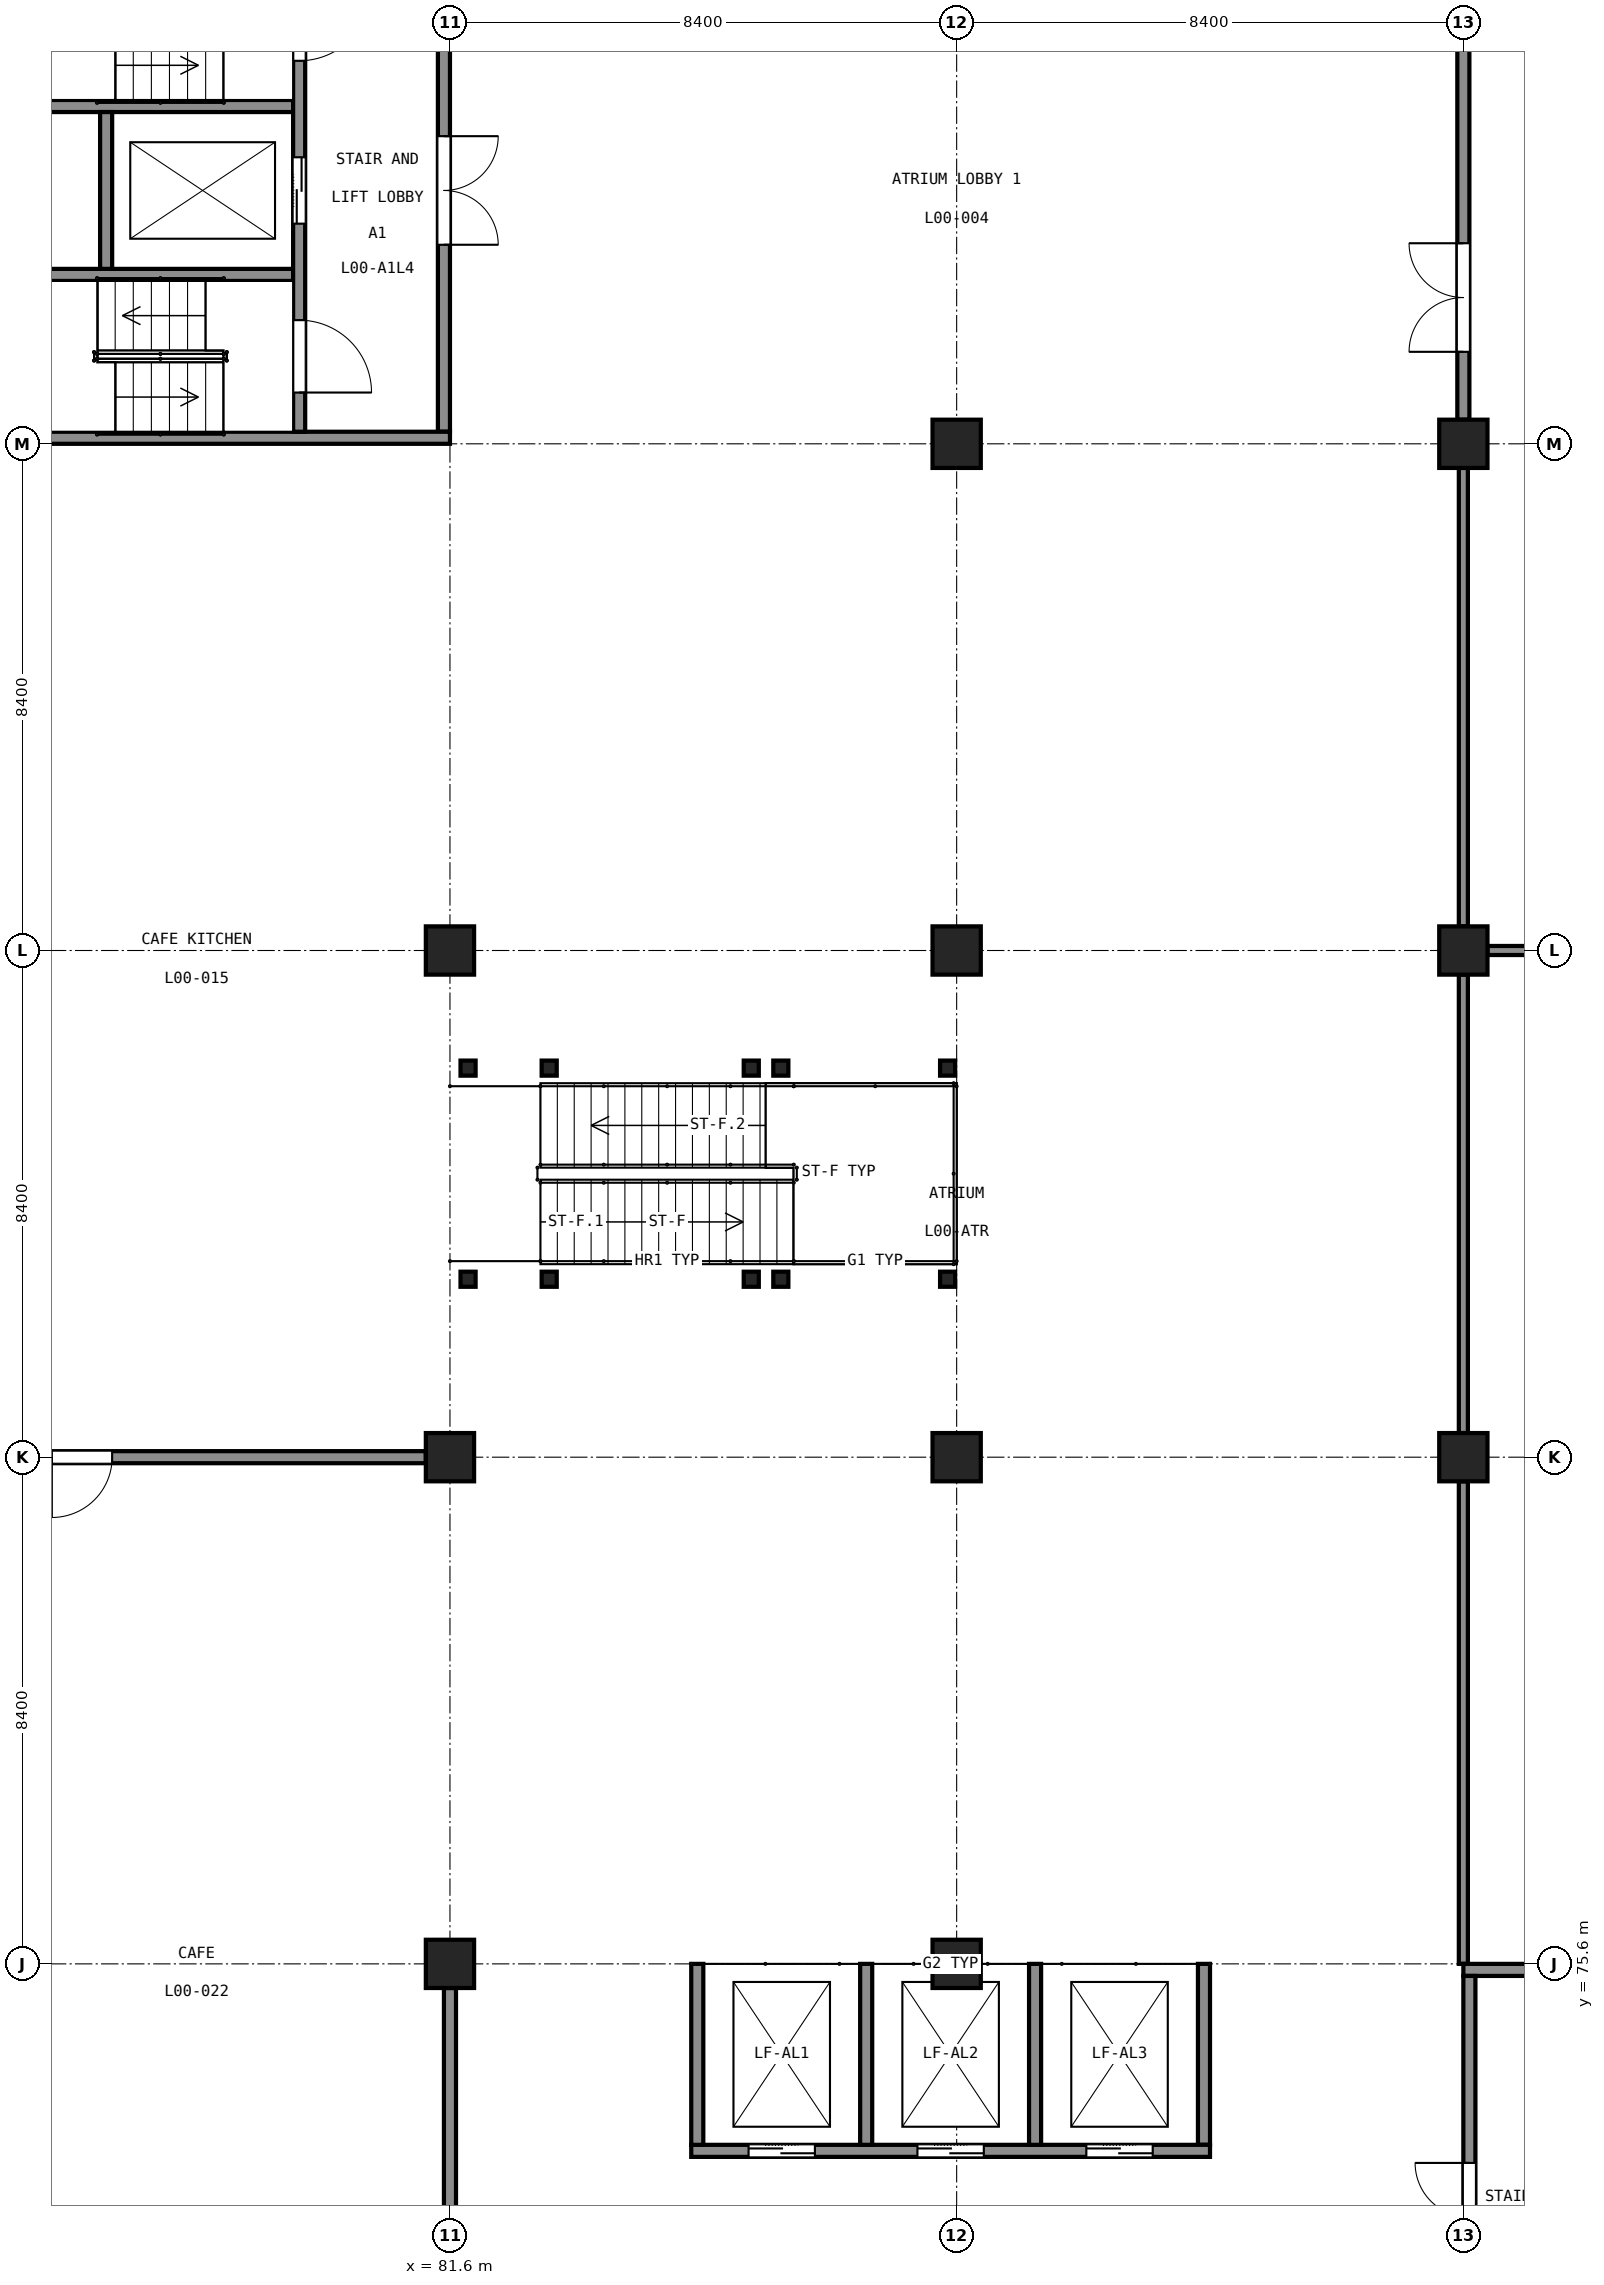
"""IFC4 building model, lengths in metres.
Left out: names, types, materials, properties, quantities, classifications, styles, units other than length and angle.
Written with IfcOpenShell. Run it as: python <this file> out.ifc"""

import sys

from ifc_helpers import new_model, si_unit, direction, frame, frame_2d, origin, origin_2d, place, context, subcontext, project, spatial, rectangle, hollow_rectangle, extrude, element, fill, save


model = new_model("IFC4")
c1 = context("Model", 3, precision=1e-05, world=origin(), true_north=direction((0.0, 1.0)))
c2 = subcontext(c1, "Body", "Model", "MODEL_VIEW")
j1 = project(units=[si_unit("LENGTHUNIT", "METRE"), si_unit("PLANEANGLEUNIT", "RADIAN")], contexts=[c1])
p1 = place(None, origin())
s1 = spatial("IfcSite", under=j1, at=p1, CompositionType="ELEMENT")
p2 = place(p1, origin())
s2 = spatial("IfcBuilding", under=s1, at=p2, CompositionType="ELEMENT")
p3 = place(p2, origin())
s3 = spatial("IfcBuildingStorey", under=s2, at=p3, CompositionType="ELEMENT", Elevation=0.0)
p4 = place(p3, frame((73.2, 100.9, -1.8), z_axis=(0.0, 0.0, 1.0), x_axis=(1.0, 0.0, 0.0)))
e1 = element("IfcWall", 1, at=p4, inside=s3, PredefinedType="SHEAR", context=c2, shape_type="SweptSolid", body=[
    extrude(rectangle(XDim=8.4, YDim=0.2, at=frame_2d((4.2, 0.0))), origin(), (0.0, 0.0, 1.0), 7.3),
])
p5 = place(p3, frame((81.5, 101.0, -1.8), z_axis=(0.0, 0.0, 1.0), x_axis=(0.0, 1.0, 0.0)))
e2 = element("IfcWall", 2, at=p5, inside=s3, PredefinedType="SHEAR", context=c2, shape_type="SweptSolid", body=[
    extrude(rectangle(XDim=8.0, YDim=0.2, at=frame_2d((4.0, 0.0))), origin(), (0.0, 0.0, 1.0), 7.3),
])
p6 = place(p5, frame((3.1, 0.0, 1.8)))
e3 = element("IfcOpeningElement", 3, at=p6, cuts=e2, PredefinedType="OPENING", context=c2, shape_type="SweptSolid", body=[
    extrude(rectangle(XDim=1.8, YDim=2.1, at=frame_2d((0.9, 1.05))), frame((0.0, 0.11, 0.0), z_axis=(0.0, -1.0, 0.0), x_axis=(1.0, 0.0, 0.0)), (0.0, 0.0, 1.0), 0.22),
])
p7 = place(p3, frame((79.1, 101.0, -1.8), z_axis=(0.0, 0.0, 1.0), x_axis=(0.0, 1.0, 0.0)))
e4 = element("IfcWall", 4, at=p7, inside=s3, PredefinedType="SHEAR", context=c2, shape_type="SweptSolid", body=[
    extrude(rectangle(XDim=8.0, YDim=0.2, at=frame_2d((4.0, 0.0))), origin(), (0.0, 0.0, 1.0), 7.3),
])
p8 = place(p7, frame((0.65, 0.0, 1.8)))
e5 = element("IfcOpeningElement", 5, at=p8, cuts=e4, PredefinedType="OPENING", context=c2, shape_type="SweptSolid", body=[
    extrude(rectangle(XDim=1.2, YDim=2.1, at=frame_2d((0.6, 1.05))), frame((0.0, 0.11, 0.0), z_axis=(0.0, -1.0, 0.0), x_axis=(1.0, 0.0, 0.0)), (0.0, 0.0, 1.0), 0.22),
])
p9 = place(p7, frame((6.15, 0.0, 1.8)))
e6 = element("IfcOpeningElement", 6, at=p9, cuts=e4, PredefinedType="OPENING", context=c2, shape_type="SweptSolid", body=[
    extrude(rectangle(XDim=1.2, YDim=2.1, at=frame_2d((0.6, 1.05))), frame((0.0, 0.11, 0.0), z_axis=(0.0, -1.0, 0.0), x_axis=(1.0, 0.0, 0.0)), (0.0, 0.0, 1.0), 0.22),
])
p10 = place(p7, frame((3.45, 0.0, 1.8)))
e7 = element("IfcOpeningElement", 7, at=p10, cuts=e4, PredefinedType="OPENING", context=c2, shape_type="SweptSolid", body=[
    extrude(rectangle(XDim=1.1, YDim=2.1, at=frame_2d((0.55, 1.05))), frame((0.0, 0.11, 0.0), z_axis=(0.0, -1.0, 0.0), x_axis=(1.0, 0.0, 0.0)), (0.0, 0.0, 1.0), 0.22),
])
for number, where, z_axis, x_axis in (
    (8, (73.4, 103.6, -1.8), (0.0, 0.0, 1.0), (1.0, 0.0, 0.0)),
    (9, (73.4, 106.4, -1.8), (0.0, 0.0, 1.0), (1.0, 0.0, 0.0)),
):
    element("IfcWall", number, at=place(p3, frame(where, z_axis=z_axis, x_axis=x_axis)), inside=s3, PredefinedType="SHEAR", context=c2, shape_type="SweptSolid", body=[
        extrude(rectangle(XDim=5.6, YDim=0.2, at=frame_2d((2.8, 0.0))), origin(), (0.0, 0.0, 1.0), 7.3),
    ])
p11 = place(p3, frame((75.9, 103.7, -1.8), z_axis=(0.0, 0.0, 1.0), x_axis=(0.0, 1.0, 0.0)))
e10 = element("IfcWall", 10, at=p11, inside=s3, PredefinedType="SHEAR", context=c2, shape_type="SweptSolid", body=[
    extrude(rectangle(XDim=2.6, YDim=0.2, at=frame_2d((1.3, 0.0))), origin(), (0.0, 0.0, 1.0), 7.3),
])
p12 = place(p3, frame((98.4, 75.5, -1.8), z_axis=(0.0, 0.0, 1.0), x_axis=(1.0, 0.0, 0.0)))
e11 = element("IfcWall", 11, at=p12, inside=s3, PredefinedType="SHEAR", context=c2, shape_type="SweptSolid", body=[
    extrude(rectangle(XDim=8.4, YDim=0.2, at=frame_2d((4.2, 0.0))), origin(), (0.0, 0.0, 1.0), 7.3),
])
p13 = place(p3, frame((98.5, 67.4, -1.8), z_axis=(0.0, 0.0, 1.0), x_axis=(0.0, 1.0, 0.0)))
e12 = element("IfcWall", 12, at=p13, inside=s3, PredefinedType="SHEAR", context=c2, shape_type="SweptSolid", body=[
    extrude(rectangle(XDim=8.0, YDim=0.2, at=frame_2d((4.0, 0.0))), origin(), (0.0, 0.0, 1.0), 7.3),
])
p14 = place(p13, frame((3.1, 0.0, 1.8)))
e13 = element("IfcOpeningElement", 13, at=p14, cuts=e12, PredefinedType="OPENING", context=c2, shape_type="SweptSolid", body=[
    extrude(rectangle(XDim=1.8, YDim=2.1, at=frame_2d((0.9, 1.05))), frame((0.0, 0.11, 0.0), z_axis=(0.0, -1.0, 0.0), x_axis=(1.0, 0.0, 0.0)), (0.0, 0.0, 1.0), 0.22),
])
p15 = place(p3, frame((85.6, 72.5, -1.8), z_axis=(0.0, 0.0, 1.0), x_axis=(1.0, 0.0, 0.0)))
e14 = element("IfcWall", 14, at=p15, inside=s3, PredefinedType="SHEAR", context=c2, shape_type="SweptSolid", body=[
    extrude(rectangle(XDim=8.6, YDim=0.2, at=frame_2d((4.3, 0.0))), origin(), (0.0, 0.0, 1.0), 7.3),
])
p16 = place(p15, frame((0.95, 0.0, 1.8)))
e15 = element("IfcOpeningElement", 15, at=p16, cuts=e14, PredefinedType="OPENING", context=c2, shape_type="SweptSolid", body=[
    extrude(rectangle(XDim=1.1, YDim=2.1, at=frame_2d((0.55, 1.05))), frame((0.0, 0.11, 0.0), z_axis=(0.0, -1.0, 0.0), x_axis=(1.0, 0.0, 0.0)), (0.0, 0.0, 1.0), 0.22),
])
p17 = place(p15, frame((3.75, 0.0, 1.8)))
e16 = element("IfcOpeningElement", 16, at=p17, cuts=e14, PredefinedType="OPENING", context=c2, shape_type="SweptSolid", body=[
    extrude(rectangle(XDim=1.1, YDim=2.1, at=frame_2d((0.55, 1.05))), frame((0.0, 0.11, 0.0), z_axis=(0.0, -1.0, 0.0), x_axis=(1.0, 0.0, 0.0)), (0.0, 0.0, 1.0), 0.22),
])
p18 = place(p15, frame((6.55, 0.0, 1.8)))
e17 = element("IfcOpeningElement", 17, at=p18, cuts=e14, PredefinedType="OPENING", context=c2, shape_type="SweptSolid", body=[
    extrude(rectangle(XDim=1.1, YDim=2.1, at=frame_2d((0.55, 1.05))), frame((0.0, 0.11, 0.0), z_axis=(0.0, -1.0, 0.0), x_axis=(1.0, 0.0, 0.0)), (0.0, 0.0, 1.0), 0.22),
])
for number, where, z_axis, x_axis in (
    (18, (85.7, 72.6, -1.8), (0.0, 0.0, 1.0), (0.0, 1.0, 0.0)),
    (19, (94.1, 72.6, -1.8), (0.0, 0.0, 1.0), (0.0, 1.0, 0.0)),
    (20, (88.5, 72.6, -1.8), (0.0, 0.0, 1.0), (0.0, 1.0, 0.0)),
    (21, (91.3, 72.6, -1.8), (0.0, 0.0, 1.0), (0.0, 1.0, 0.0)),
):
    element("IfcWall", number, at=place(p3, frame(where, z_axis=z_axis, x_axis=x_axis)), inside=s3, PredefinedType="SHEAR", context=c2, shape_type="SweptSolid", body=[
        extrude(rectangle(XDim=3.0, YDim=0.2, at=frame_2d((1.5, 0.0))), origin(), (0.0, 0.0, 1.0), 7.3),
    ])
for number, where, z_axis, x_axis in (
    (22, (81.6, 75.6, -0.3), (0.0, 0.0, 1.0), (1.0, 0.0, 0.0)),
    (23, (81.6, 84.0, -0.3), (0.0, 0.0, 1.0), (1.0, 0.0, 0.0)),
    (24, (81.6, 92.4, -0.3), (0.0, 0.0, 1.0), (1.0, 0.0, 0.0)),
    (25, (90.0, 75.6, -0.3), (0.0, 0.0, 1.0), (1.0, 0.0, 0.0)),
    (26, (90.0, 84.0, -0.3), (0.0, 0.0, 1.0), (1.0, 0.0, 0.0)),
    (27, (90.0, 92.4, -0.3), (0.0, 0.0, 1.0), (1.0, 0.0, 0.0)),
    (28, (90.0, 100.8, -0.3), (0.0, 0.0, 1.0), (1.0, 0.0, 0.0)),
    (29, (98.4, 84.0, -0.3), (0.0, 0.0, 1.0), (1.0, 0.0, 0.0)),
    (30, (98.4, 92.4, -0.3), (0.0, 0.0, 1.0), (1.0, 0.0, 0.0)),
    (31, (98.4, 100.8, -0.3), (0.0, 0.0, 1.0), (1.0, 0.0, 0.0)),
):
    element("IfcColumn", number, at=place(p3, frame(where, z_axis=z_axis, x_axis=x_axis)), inside=s3, PredefinedType="COLUMN", context=c2, shape_type="SweptSolid", body=[
        extrude(rectangle(XDim=0.8, YDim=0.8, at=origin_2d()), origin(), (0.0, 0.0, 1.0), 5.8),
    ])
p19 = place(p3, frame((98.4, 101.2, 0.0), z_axis=(0.0, 0.0, 1.0), x_axis=(0.0, 1.0, 0.0)))
e32 = element("IfcWall", 32, at=p19, inside=s3, PredefinedType="PARTITIONING", context=c2, shape_type="SweptSolid", body=[
    extrude(rectangle(XDim=7.6, YDim=0.2, at=frame_2d((3.8, 0.0))), origin(), (0.0, 0.0, 1.0), 4.4),
])
p20 = place(p19, frame((1.125, 0.0, 0.0)))
e33 = element("IfcOpeningElement", 33, at=p20, cuts=e32, PredefinedType="OPENING", context=c2, shape_type="SweptSolid", body=[
    extrude(rectangle(XDim=1.8, YDim=2.1, at=frame_2d((0.9, 1.05))), frame((0.0, 0.11, 0.0), z_axis=(0.0, -1.0, 0.0), x_axis=(1.0, 0.0, 0.0)), (0.0, 0.0, 1.0), 0.22),
])
for number, where, z_axis, x_axis in (
    (34, (98.8, 92.4, 0.0), (0.0, 0.0, 1.0), (1.0, 0.0, 0.0)),
    (35, (98.4, 92.8, 0.0), (0.0, 0.0, 1.0), (0.0, 1.0, 0.0)),
):
    element("IfcWall", number, at=place(p3, frame(where, z_axis=z_axis, x_axis=x_axis)), inside=s3, PredefinedType="PARTITIONING", context=c2, shape_type="SweptSolid", body=[
        extrude(rectangle(XDim=7.6, YDim=0.15, at=frame_2d((3.8, 0.0))), origin(), (0.0, 0.0, 1.0), 4.4),
    ])
p21 = place(p3, frame((73.35, 84.0, 0.0), z_axis=(0.0, 0.0, 1.0), x_axis=(1.0, 0.0, 0.0)))
e36 = element("IfcWall", 36, at=p21, inside=s3, PredefinedType="PARTITIONING", context=c2, shape_type="SweptSolid", body=[
    extrude(rectangle(XDim=7.85, YDim=0.2, at=frame_2d((3.925, 0.0))), origin(), (0.0, 0.0, 1.0), 4.4),
])
p22 = place(p21, frame((1.65, 0.0, 0.0)))
e37 = element("IfcOpeningElement", 37, at=p22, cuts=e36, PredefinedType="OPENING", context=c2, shape_type="SweptSolid", body=[
    extrude(rectangle(XDim=1.0, YDim=2.1, at=frame_2d((0.5, 1.05))), frame((0.0, 0.11, 0.0), z_axis=(0.0, -1.0, 0.0), x_axis=(1.0, 0.0, 0.0)), (0.0, 0.0, 1.0), 0.22),
])
p23 = place(p3, frame((98.4, 75.6, 0.0), z_axis=(0.0, 0.0, 1.0), x_axis=(0.0, 1.0, 0.0)))
e38 = element("IfcWall", 38, at=p23, inside=s3, PredefinedType="PARTITIONING", context=c2, shape_type="SweptSolid", body=[
    extrude(rectangle(XDim=8.0, YDim=0.15, at=frame_2d((4.0, 0.0))), origin(), (0.0, 0.0, 1.0), 4.4),
])
p24 = place(p3, frame((98.4, 84.4, 0.0), z_axis=(0.0, 0.0, 1.0), x_axis=(0.0, 1.0, 0.0)))
e39 = element("IfcWall", 39, at=p24, inside=s3, PredefinedType="PARTITIONING", context=c2, shape_type="SweptSolid", body=[
    extrude(rectangle(XDim=7.6, YDim=0.15, at=frame_2d((3.8, 0.0))), origin(), (0.0, 0.0, 1.0), 4.4),
])
p25 = place(p3, frame((81.6, 67.6, 0.0), z_axis=(0.0, 0.0, 1.0), x_axis=(0.0, 1.0, 0.0)))
e40 = element("IfcWall", 40, at=p25, inside=s3, PredefinedType="PARTITIONING", context=c2, shape_type="SweptSolid", body=[
    extrude(rectangle(XDim=7.6, YDim=0.2, at=frame_2d((3.8, 0.0))), origin(), (0.0, 0.0, 1.0), 4.4),
])
p26 = place(p25, frame((1.125, 0.0, 0.0)))
e41 = element("IfcOpeningElement", 41, at=p26, cuts=e40, PredefinedType="OPENING", context=c2, shape_type="SweptSolid", body=[
    extrude(rectangle(XDim=1.8, YDim=2.1, at=frame_2d((0.9, 1.05))), frame((0.0, 0.11, 0.0), z_axis=(0.0, -1.0, 0.0), x_axis=(1.0, 0.0, 0.0)), (0.0, 0.0, 1.0), 0.22),
])
for number, where, z_axis, x_axis in (
    (42, (81.9, 86.95, -0.3), (0.0, 0.0, 1.0), (1.0, 0.0, 0.0)),
    (43, (81.9, 90.45, -0.3), (0.0, 0.0, 1.0), (1.0, 0.0, 0.0)),
    (44, (83.245, 86.95, -0.3), (0.0, 0.0, 1.0), (1.0, 0.0, 0.0)),
    (45, (83.245, 90.45, -0.3), (0.0, 0.0, 1.0), (1.0, 0.0, 0.0)),
    (46, (86.595, 86.95, -0.3), (0.0, 0.0, 1.0), (1.0, 0.0, 0.0)),
    (47, (86.595, 90.45, -0.3), (0.0, 0.0, 1.0), (1.0, 0.0, 0.0)),
    (48, (87.085, 86.95, -0.3), (0.0, 0.0, 1.0), (1.0, 0.0, 0.0)),
    (49, (87.085, 90.45, -0.3), (0.0, 0.0, 1.0), (1.0, 0.0, 0.0)),
    (50, (89.85, 86.95, -0.3), (0.0, 0.0, 1.0), (1.0, 0.0, 0.0)),
    (51, (89.85, 90.45, -0.3), (0.0, 0.0, 1.0), (1.0, 0.0, 0.0)),
):
    element("IfcColumn", number, at=place(p3, frame(where, z_axis=z_axis, x_axis=x_axis)), inside=s3, PredefinedType="COLUMN", context=c2, shape_type="SweptSolid", body=[
        extrude(hollow_rectangle(XDim=0.25, YDim=0.25, WallThickness=0.012, InnerFilletRadius=0.025, OuterFilletRadius=0.038, at=origin_2d()), origin(), (0.0, 0.0, 1.0), 5.8),
    ])
p27 = place(p20, origin())
e52 = element("IfcDoor", 52, at=p27, inside=s3, OperationType="DOUBLE_DOOR_SINGLE_SWING", PredefinedType="DOOR", context=c2, shape_type="SweptSolid", body=[
    extrude(rectangle(XDim=1.8, YDim=2.1, at=frame_2d((0.9, 1.05))), frame((0.0, 0.025, 0.0), z_axis=(0.0, -1.0, 0.0), x_axis=(1.0, 0.0, 0.0)), (0.0, 0.0, 1.0), 0.05),
])
fill(e33, e52)
p28 = place(p22, origin())
e53 = element("IfcDoor", 53, at=p28, inside=s3, OperationType="SINGLE_SWING_LEFT", PredefinedType="DOOR", context=c2, shape_type="SweptSolid", body=[
    extrude(rectangle(XDim=1.0, YDim=2.1, at=frame_2d((0.5, 1.05))), frame((0.0, 0.025, 0.0), z_axis=(0.0, -1.0, 0.0), x_axis=(1.0, 0.0, 0.0)), (0.0, 0.0, 1.0), 0.05),
])
fill(e37, e53)
p29 = place(p6, origin())
e54 = element("IfcDoor", 54, at=p29, inside=s3, OperationType="DOUBLE_DOOR_SINGLE_SWING", PredefinedType="DOOR", context=c2, shape_type="SweptSolid", body=[
    extrude(rectangle(XDim=1.8, YDim=2.1, at=frame_2d((0.9, 1.05))), frame((0.0, 0.025, 0.0), z_axis=(0.0, -1.0, 0.0), x_axis=(1.0, 0.0, 0.0)), (0.0, 0.0, 1.0), 0.05),
])
fill(e3, e54)
p30 = place(p8, origin())
e55 = element("IfcDoor", 55, at=p30, inside=s3, OperationType="SINGLE_SWING_LEFT", PredefinedType="DOOR", context=c2, shape_type="SweptSolid", body=[
    extrude(rectangle(XDim=1.2, YDim=2.1, at=frame_2d((0.6, 1.05))), frame((0.0, 0.025, 0.0), z_axis=(0.0, -1.0, 0.0), x_axis=(1.0, 0.0, 0.0)), (0.0, 0.0, 1.0), 0.05),
])
fill(e5, e55)
p31 = place(p9, origin())
e56 = element("IfcDoor", 56, at=p31, inside=s3, OperationType="SINGLE_SWING_RIGHT", PredefinedType="DOOR", context=c2, shape_type="SweptSolid", body=[
    extrude(rectangle(XDim=1.2, YDim=2.1, at=frame_2d((0.6, 1.05))), frame((0.0, 0.025, 0.0), z_axis=(0.0, -1.0, 0.0), x_axis=(1.0, 0.0, 0.0)), (0.0, 0.0, 1.0), 0.05),
])
fill(e6, e56)
p32 = place(p10, origin())
e57 = element("IfcDoor", 57, at=p32, inside=s3, OperationType="DOUBLE_DOOR_SLIDING", PredefinedType="DOOR", context=c2, shape_type="SweptSolid", body=[
    extrude(rectangle(XDim=1.1, YDim=2.1, at=frame_2d((0.55, 1.05))), frame((0.0, 0.025, 0.0), z_axis=(0.0, -1.0, 0.0), x_axis=(1.0, 0.0, 0.0)), (0.0, 0.0, 1.0), 0.05),
])
fill(e7, e57)
p33 = place(p14, origin())
e58 = element("IfcDoor", 58, at=p33, inside=s3, OperationType="DOUBLE_DOOR_SINGLE_SWING", PredefinedType="DOOR", context=c2, shape_type="SweptSolid", body=[
    extrude(rectangle(XDim=1.8, YDim=2.1, at=frame_2d((0.9, 1.05))), frame((0.0, 0.025, 0.0), z_axis=(0.0, -1.0, 0.0), x_axis=(1.0, 0.0, 0.0)), (0.0, 0.0, 1.0), 0.05),
])
fill(e13, e58)
p34 = place(p16, origin())
e59 = element("IfcDoor", 59, at=p34, inside=s3, OperationType="DOUBLE_DOOR_SLIDING", PredefinedType="DOOR", context=c2, shape_type="SweptSolid", body=[
    extrude(rectangle(XDim=1.1, YDim=2.1, at=frame_2d((0.55, 1.05))), frame((0.0, 0.025, 0.0), z_axis=(0.0, -1.0, 0.0), x_axis=(1.0, 0.0, 0.0)), (0.0, 0.0, 1.0), 0.05),
])
fill(e15, e59)
p35 = place(p17, origin())
e60 = element("IfcDoor", 60, at=p35, inside=s3, OperationType="DOUBLE_DOOR_SLIDING", PredefinedType="DOOR", context=c2, shape_type="SweptSolid", body=[
    extrude(rectangle(XDim=1.1, YDim=2.1, at=frame_2d((0.55, 1.05))), frame((0.0, 0.025, 0.0), z_axis=(0.0, -1.0, 0.0), x_axis=(1.0, 0.0, 0.0)), (0.0, 0.0, 1.0), 0.05),
])
fill(e16, e60)
p36 = place(p18, origin())
e61 = element("IfcDoor", 61, at=p36, inside=s3, OperationType="DOUBLE_DOOR_SLIDING", PredefinedType="DOOR", context=c2, shape_type="SweptSolid", body=[
    extrude(rectangle(XDim=1.1, YDim=2.1, at=frame_2d((0.55, 1.05))), frame((0.0, 0.025, 0.0), z_axis=(0.0, -1.0, 0.0), x_axis=(1.0, 0.0, 0.0)), (0.0, 0.0, 1.0), 0.05),
])
fill(e17, e61)
save(model, sys.argv[1])
